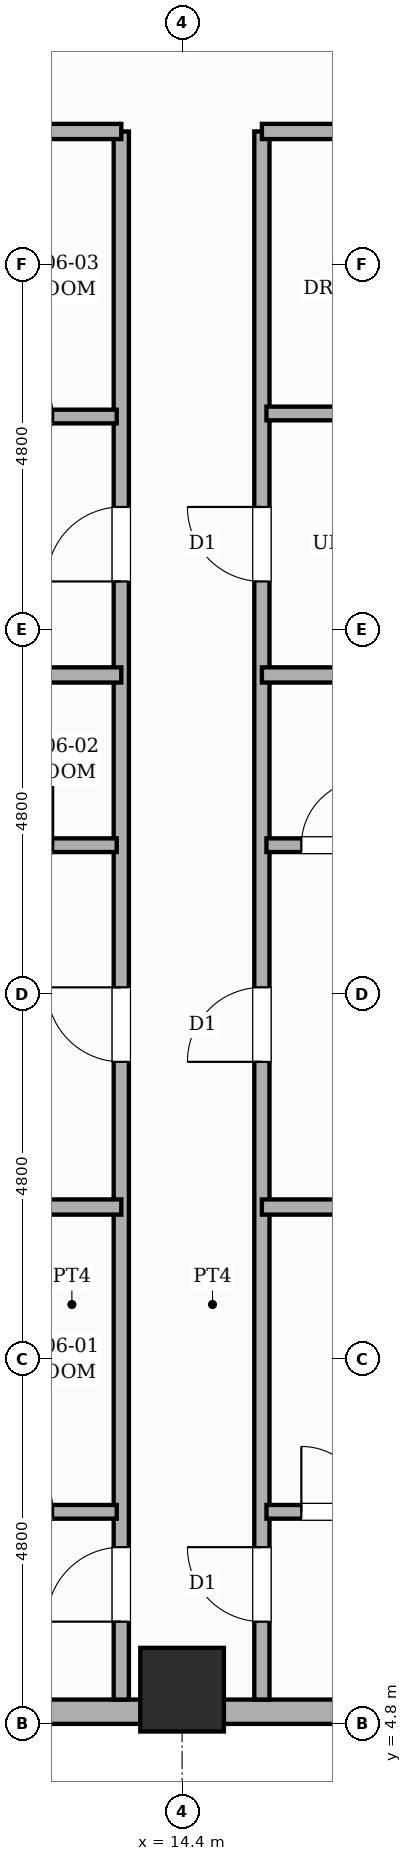
"""IFC4 building model, lengths in metres.
Left out: names, types, materials, properties, quantities, classifications, styles, units other than length and angle.
Written with IfcOpenShell. Run it as: python <this file> out.ifc"""

import sys

from ifc_helpers import new_model, si_unit, direction, frame, frame_2d, origin, origin_2d, place, context, subcontext, project, spatial, rectangle, extrude, element, fill, save


model = new_model("IFC4")
c1 = context("Model", 3, precision=1e-05, world=origin(), true_north=direction((0.0, 1.0)))
c2 = subcontext(c1, "Body", "Model", "MODEL_VIEW")
j1 = project(units=[si_unit("LENGTHUNIT", "METRE"), si_unit("PLANEANGLEUNIT", "RADIAN")], contexts=[c1])
p1 = place(None, origin())
s1 = spatial("IfcSite", under=j1, at=p1, CompositionType="ELEMENT")
p2 = place(p1, origin())
s2 = spatial("IfcBuilding", under=s1, at=p2, CompositionType="ELEMENT")
p3 = place(p2, frame((0.0, 0.0, 28.6)))
s3 = spatial("IfcBuildingStorey", under=s2, at=p3, CompositionType="ELEMENT", Elevation=28.6)
p4 = place(p3, frame((14.4, 5.25, 0.0), z_axis=(0.0, 0.0, 1.0), x_axis=(1.0, 0.0, 0.0)))
e1 = element("IfcColumn", 1, at=p4, inside=s3, PredefinedType="COLUMN", context=c2, shape_type="SweptSolid", body=[
    extrude(rectangle(XDim=1.1, YDim=1.1, at=origin_2d()), origin(), (0.0, 0.0, 1.0), 3.6),
])
p5 = place(p3, frame((21.6, 4.96, 0.0), z_axis=(0.0, 0.0, 1.0), x_axis=(-1.0, 0.0, 0.0)))
e2 = element("IfcWall", 2, at=p5, inside=s3, PredefinedType="STANDARD", context=c2, shape_type="SweptSolid", body=[
    extrude(rectangle(XDim=14.4, YDim=0.32, at=frame_2d((7.2, 0.0))), origin(), (0.0, 0.0, 1.0), 2.53),
])
p6 = place(p5, frame((9.015, 0.0, 0.65)))
e3 = element("IfcOpeningElement", 3, at=p6, cuts=e2, PredefinedType="OPENING", context=c2, shape_type="SweptSolid", body=[
    extrude(rectangle(XDim=1.4, YDim=1.1, at=frame_2d((0.7, 0.55))), frame((0.0, 0.17, 0.0), z_axis=(0.0, -1.0, 0.0), x_axis=(1.0, 0.0, 0.0)), (0.0, 0.0, 1.0), 0.34),
])
p7 = place(p5, frame((0.47, 0.0, 0.45)))
e4 = element("IfcOpeningElement", 4, at=p7, cuts=e2, PredefinedType="OPENING", context=c2, shape_type="SweptSolid", body=[
    extrude(rectangle(XDim=0.95, YDim=1.8, at=frame_2d((0.475, 0.9))), frame((0.0, 0.17, 0.0), z_axis=(0.0, -1.0, 0.0), x_axis=(1.0, 0.0, 0.0)), (0.0, 0.0, 1.0), 0.34),
])
p8 = place(p3, frame((13.6, 5.12, 0.0), z_axis=(0.0, 0.0, 1.0), x_axis=(0.0, 1.0, 0.0)))
e5 = element("IfcWall", 5, at=p8, inside=s3, PredefinedType="PARTITIONING", context=c2, shape_type="SweptSolid", body=[
    extrude(rectangle(XDim=20.63, YDim=0.2, at=frame_2d((10.315, 0.0))), origin(), (0.0, 0.0, 1.0), 3.35),
])
p9 = place(p8, frame((1.025, 0.0, 0.0)))
e6 = element("IfcOpeningElement", 6, at=p9, cuts=e5, PredefinedType="OPENING", context=c2, shape_type="SweptSolid", body=[
    extrude(rectangle(XDim=0.98, YDim=2.18, at=frame_2d((0.49, 1.09))), frame((0.0, 0.11, 0.0), z_axis=(0.0, -1.0, 0.0), x_axis=(1.0, 0.0, 0.0)), (0.0, 0.0, 1.0), 0.22),
])
p10 = place(p8, frame((8.39, 0.0, 0.0)))
e7 = element("IfcOpeningElement", 7, at=p10, cuts=e5, PredefinedType="OPENING", context=c2, shape_type="SweptSolid", body=[
    extrude(rectangle(XDim=0.98, YDim=2.18, at=frame_2d((0.49, 1.09))), frame((0.0, 0.11, 0.0), z_axis=(0.0, -1.0, 0.0), x_axis=(1.0, 0.0, 0.0)), (0.0, 0.0, 1.0), 0.22),
])
p11 = place(p8, frame((14.71, 0.0, 0.0)))
e8 = element("IfcOpeningElement", 8, at=p11, cuts=e5, PredefinedType="OPENING", context=c2, shape_type="SweptSolid", body=[
    extrude(rectangle(XDim=0.98, YDim=2.18, at=frame_2d((0.49, 1.09))), frame((0.0, 0.11, 0.0), z_axis=(0.0, -1.0, 0.0), x_axis=(1.0, 0.0, 0.0)), (0.0, 0.0, 1.0), 0.22),
])
p12 = place(p3, frame((15.45, 5.12, 0.0), z_axis=(0.0, 0.0, 1.0), x_axis=(0.0, 1.0, 0.0)))
e9 = element("IfcWall", 9, at=p12, inside=s3, PredefinedType="PARTITIONING", context=c2, shape_type="SweptSolid", body=[
    extrude(rectangle(XDim=20.63, YDim=0.2, at=frame_2d((10.315, 0.0))), origin(), (0.0, 0.0, 1.0), 3.35),
])
p13 = place(p12, frame((1.025, 0.0, 0.0)))
e10 = element("IfcOpeningElement", 10, at=p13, cuts=e9, PredefinedType="OPENING", context=c2, shape_type="SweptSolid", body=[
    extrude(rectangle(XDim=0.98, YDim=2.18, at=frame_2d((0.49, 1.09))), frame((0.0, 0.11, 0.0), z_axis=(0.0, -1.0, 0.0), x_axis=(1.0, 0.0, 0.0)), (0.0, 0.0, 1.0), 0.22),
])
p14 = place(p12, frame((8.39, 0.0, 0.0)))
e11 = element("IfcOpeningElement", 11, at=p14, cuts=e9, PredefinedType="OPENING", context=c2, shape_type="SweptSolid", body=[
    extrude(rectangle(XDim=0.98, YDim=2.18, at=frame_2d((0.49, 1.09))), frame((0.0, 0.11, 0.0), z_axis=(0.0, -1.0, 0.0), x_axis=(1.0, 0.0, 0.0)), (0.0, 0.0, 1.0), 0.22),
])
p15 = place(p12, frame((14.71, 0.0, 0.0)))
e12 = element("IfcOpeningElement", 12, at=p15, cuts=e9, PredefinedType="OPENING", context=c2, shape_type="SweptSolid", body=[
    extrude(rectangle(XDim=0.98, YDim=2.18, at=frame_2d((0.49, 1.09))), frame((0.0, 0.11, 0.0), z_axis=(0.0, -1.0, 0.0), x_axis=(1.0, 0.0, 0.0)), (0.0, 0.0, 1.0), 0.22),
])
p16 = place(p3, frame((5.12, 25.75, 0.0), z_axis=(0.0, 0.0, 1.0), x_axis=(1.0, 0.0, 0.0)))
e13 = element("IfcWall", 13, at=p16, inside=s3, PredefinedType="PARTITIONING", context=c2, shape_type="SweptSolid", body=[
    extrude(rectangle(XDim=8.48, YDim=0.2, at=frame_2d((4.24, 0.0))), origin(), (0.0, 0.0, 1.0), 3.35),
])
p17 = place(p3, frame((15.45, 25.75, 0.0), z_axis=(0.0, 0.0, 1.0), x_axis=(1.0, 0.0, 0.0)))
e14 = element("IfcWall", 14, at=p17, inside=s3, PredefinedType="PARTITIONING", context=c2, shape_type="SweptSolid", body=[
    extrude(rectangle(XDim=8.23, YDim=0.2, at=frame_2d((4.115, 0.0))), origin(), (0.0, 0.0, 1.0), 3.35),
])
p18 = place(p3, frame((5.12, 7.59, 0.0), z_axis=(0.0, 0.0, 1.0), x_axis=(1.0, 0.0, 0.0)))
e15 = element("IfcWall", 15, at=p18, inside=s3, PredefinedType="PLUMBINGWALL", context=c2, shape_type="SweptSolid", body=[
    extrude(rectangle(XDim=8.42, YDim=0.18, at=frame_2d((4.21, 0.0))), origin(), (0.0, 0.0, 1.0), 3.35),
])
p19 = place(p18, frame((1.046, 0.0, 0.0)))
e16 = element("IfcOpeningElement", 16, at=p19, cuts=e15, PredefinedType="OPENING", context=c2, shape_type="SweptSolid", body=[
    extrude(rectangle(XDim=0.9, YDim=2.15, at=frame_2d((0.45, 1.075))), frame((0.0, 0.1, 0.0), z_axis=(0.0, -1.0, 0.0), x_axis=(1.0, 0.0, 0.0)), (0.0, 0.0, 1.0), 0.2),
])
p20 = place(p18, frame((4.307, 0.0, 0.0)))
e17 = element("IfcOpeningElement", 17, at=p20, cuts=e15, PredefinedType="OPENING", context=c2, shape_type="SweptSolid", body=[
    extrude(rectangle(XDim=0.9, YDim=2.15, at=frame_2d((0.45, 1.075))), frame((0.0, 0.1, 0.0), z_axis=(0.0, -1.0, 0.0), x_axis=(1.0, 0.0, 0.0)), (0.0, 0.0, 1.0), 0.2),
])
p21 = place(p18, frame((6.723, 0.0, 0.0)))
e18 = element("IfcOpeningElement", 18, at=p21, cuts=e15, PredefinedType="OPENING", context=c2, shape_type="SweptSolid", body=[
    extrude(rectangle(XDim=0.86, YDim=2.1, at=frame_2d((0.43, 1.05))), frame((0.0, 0.1, 0.0), z_axis=(0.0, -1.0, 0.0), x_axis=(1.0, 0.0, 0.0)), (0.0, 0.0, 1.0), 0.2),
])
p22 = place(p3, frame((5.12, 11.6, 0.0), z_axis=(0.0, 0.0, 1.0), x_axis=(1.0, 0.0, 0.0)))
e19 = element("IfcWall", 19, at=p22, inside=s3, PredefinedType="SOLIDWALL", context=c2, shape_type="SweptSolid", body=[
    extrude(rectangle(XDim=8.48, YDim=0.2, at=frame_2d((4.24, 0.0))), origin(), (0.0, 0.0, 1.0), 3.35),
])
p23 = place(p3, frame((5.12, 16.36, 0.0), z_axis=(0.0, 0.0, 1.0), x_axis=(1.0, 0.0, 0.0)))
e20 = element("IfcWall", 20, at=p23, inside=s3, PredefinedType="PLUMBINGWALL", context=c2, shape_type="SweptSolid", body=[
    extrude(rectangle(XDim=8.42, YDim=0.18, at=frame_2d((4.21, 0.0))), origin(), (0.0, 0.0, 1.0), 3.35),
])
p24 = place(p23, frame((1.046, 0.0, 0.0)))
e21 = element("IfcOpeningElement", 21, at=p24, cuts=e20, PredefinedType="OPENING", context=c2, shape_type="SweptSolid", body=[
    extrude(rectangle(XDim=0.9, YDim=2.15, at=frame_2d((0.45, 1.075))), frame((0.0, 0.1, 0.0), z_axis=(0.0, -1.0, 0.0), x_axis=(1.0, 0.0, 0.0)), (0.0, 0.0, 1.0), 0.2),
])
p25 = place(p23, frame((4.307, 0.0, 0.0)))
e22 = element("IfcOpeningElement", 22, at=p25, cuts=e20, PredefinedType="OPENING", context=c2, shape_type="SweptSolid", body=[
    extrude(rectangle(XDim=0.9, YDim=2.15, at=frame_2d((0.45, 1.075))), frame((0.0, 0.1, 0.0), z_axis=(0.0, -1.0, 0.0), x_axis=(1.0, 0.0, 0.0)), (0.0, 0.0, 1.0), 0.2),
])
p26 = place(p23, frame((6.723, 0.0, 0.0)))
e23 = element("IfcOpeningElement", 23, at=p26, cuts=e20, PredefinedType="OPENING", context=c2, shape_type="SweptSolid", body=[
    extrude(rectangle(XDim=0.86, YDim=2.1, at=frame_2d((0.43, 1.05))), frame((0.0, 0.1, 0.0), z_axis=(0.0, -1.0, 0.0), x_axis=(1.0, 0.0, 0.0)), (0.0, 0.0, 1.0), 0.2),
])
p27 = place(p3, frame((5.12, 18.6, 0.0), z_axis=(0.0, 0.0, 1.0), x_axis=(1.0, 0.0, 0.0)))
e24 = element("IfcWall", 24, at=p27, inside=s3, PredefinedType="SOLIDWALL", context=c2, shape_type="SweptSolid", body=[
    extrude(rectangle(XDim=8.48, YDim=0.2, at=frame_2d((4.24, 0.0))), origin(), (0.0, 0.0, 1.0), 3.35),
])
p28 = place(p3, frame((5.12, 22.0, 0.0), z_axis=(0.0, 0.0, 1.0), x_axis=(1.0, 0.0, 0.0)))
e25 = element("IfcWall", 25, at=p28, inside=s3, PredefinedType="PLUMBINGWALL", context=c2, shape_type="SweptSolid", body=[
    extrude(rectangle(XDim=8.42, YDim=0.18, at=frame_2d((4.21, 0.0))), origin(), (0.0, 0.0, 1.0), 3.35),
])
p29 = place(p28, frame((1.046, 0.0, 0.0)))
e26 = element("IfcOpeningElement", 26, at=p29, cuts=e25, PredefinedType="OPENING", context=c2, shape_type="SweptSolid", body=[
    extrude(rectangle(XDim=0.9, YDim=2.15, at=frame_2d((0.45, 1.075))), frame((0.0, 0.1, 0.0), z_axis=(0.0, -1.0, 0.0), x_axis=(1.0, 0.0, 0.0)), (0.0, 0.0, 1.0), 0.2),
])
p30 = place(p28, frame((4.307, 0.0, 0.0)))
e27 = element("IfcOpeningElement", 27, at=p30, cuts=e25, PredefinedType="OPENING", context=c2, shape_type="SweptSolid", body=[
    extrude(rectangle(XDim=0.9, YDim=2.15, at=frame_2d((0.45, 1.075))), frame((0.0, 0.1, 0.0), z_axis=(0.0, -1.0, 0.0), x_axis=(1.0, 0.0, 0.0)), (0.0, 0.0, 1.0), 0.2),
])
p31 = place(p28, frame((6.723, 0.0, 0.0)))
e28 = element("IfcOpeningElement", 28, at=p31, cuts=e25, PredefinedType="OPENING", context=c2, shape_type="SweptSolid", body=[
    extrude(rectangle(XDim=0.86, YDim=2.1, at=frame_2d((0.43, 1.05))), frame((0.0, 0.1, 0.0), z_axis=(0.0, -1.0, 0.0), x_axis=(1.0, 0.0, 0.0)), (0.0, 0.0, 1.0), 0.2),
])
p32 = place(p3, frame((15.51, 7.59, 0.0), z_axis=(0.0, 0.0, 1.0), x_axis=(1.0, 0.0, 0.0)))
e29 = element("IfcWall", 29, at=p32, inside=s3, PredefinedType="PLUMBINGWALL", context=c2, shape_type="SweptSolid", body=[
    extrude(rectangle(XDim=8.17, YDim=0.18, at=frame_2d((4.085, 0.0))), origin(), (0.0, 0.0, 1.0), 3.35),
])
p33 = place(p32, frame((0.459, 0.0, 0.0)))
e30 = element("IfcOpeningElement", 30, at=p33, cuts=e29, PredefinedType="OPENING", context=c2, shape_type="SweptSolid", body=[
    extrude(rectangle(XDim=0.86, YDim=2.1, at=frame_2d((0.43, 1.05))), frame((0.0, 0.1, 0.0), z_axis=(0.0, -1.0, 0.0), x_axis=(1.0, 0.0, 0.0)), (0.0, 0.0, 1.0), 0.2),
])
p34 = place(p32, frame((2.722, 0.0, 0.0)))
e31 = element("IfcOpeningElement", 31, at=p34, cuts=e29, PredefinedType="OPENING", context=c2, shape_type="SweptSolid", body=[
    extrude(rectangle(XDim=0.9, YDim=2.15, at=frame_2d((0.45, 1.075))), frame((0.0, 0.1, 0.0), z_axis=(0.0, -1.0, 0.0), x_axis=(1.0, 0.0, 0.0)), (0.0, 0.0, 1.0), 0.2),
])
p35 = place(p32, frame((5.766, 0.0, 0.0)))
e32 = element("IfcOpeningElement", 32, at=p35, cuts=e29, PredefinedType="OPENING", context=c2, shape_type="SweptSolid", body=[
    extrude(rectangle(XDim=0.9, YDim=2.15, at=frame_2d((0.45, 1.075))), frame((0.0, 0.1, 0.0), z_axis=(0.0, -1.0, 0.0), x_axis=(1.0, 0.0, 0.0)), (0.0, 0.0, 1.0), 0.2),
])
p36 = place(p3, frame((15.45, 11.6, 0.0), z_axis=(0.0, 0.0, 1.0), x_axis=(1.0, 0.0, 0.0)))
e33 = element("IfcWall", 33, at=p36, inside=s3, PredefinedType="SOLIDWALL", context=c2, shape_type="SweptSolid", body=[
    extrude(rectangle(XDim=8.23, YDim=0.2, at=frame_2d((4.115, 0.0))), origin(), (0.0, 0.0, 1.0), 3.35),
])
p37 = place(p3, frame((15.51, 16.36, 0.0), z_axis=(0.0, 0.0, 1.0), x_axis=(1.0, 0.0, 0.0)))
e34 = element("IfcWall", 34, at=p37, inside=s3, PredefinedType="PLUMBINGWALL", context=c2, shape_type="SweptSolid", body=[
    extrude(rectangle(XDim=8.17, YDim=0.18, at=frame_2d((4.085, 0.0))), origin(), (0.0, 0.0, 1.0), 3.35),
])
p38 = place(p37, frame((0.459, 0.0, 0.0)))
e35 = element("IfcOpeningElement", 35, at=p38, cuts=e34, PredefinedType="OPENING", context=c2, shape_type="SweptSolid", body=[
    extrude(rectangle(XDim=0.86, YDim=2.1, at=frame_2d((0.43, 1.05))), frame((0.0, 0.1, 0.0), z_axis=(0.0, -1.0, 0.0), x_axis=(1.0, 0.0, 0.0)), (0.0, 0.0, 1.0), 0.2),
])
p39 = place(p37, frame((2.722, 0.0, 0.0)))
e36 = element("IfcOpeningElement", 36, at=p39, cuts=e34, PredefinedType="OPENING", context=c2, shape_type="SweptSolid", body=[
    extrude(rectangle(XDim=0.9, YDim=2.15, at=frame_2d((0.45, 1.075))), frame((0.0, 0.1, 0.0), z_axis=(0.0, -1.0, 0.0), x_axis=(1.0, 0.0, 0.0)), (0.0, 0.0, 1.0), 0.2),
])
p40 = place(p37, frame((5.766, 0.0, 0.0)))
e37 = element("IfcOpeningElement", 37, at=p40, cuts=e34, PredefinedType="OPENING", context=c2, shape_type="SweptSolid", body=[
    extrude(rectangle(XDim=0.9, YDim=2.15, at=frame_2d((0.45, 1.075))), frame((0.0, 0.1, 0.0), z_axis=(0.0, -1.0, 0.0), x_axis=(1.0, 0.0, 0.0)), (0.0, 0.0, 1.0), 0.2),
])
p41 = place(p3, frame((15.45, 18.6, 0.0), z_axis=(0.0, 0.0, 1.0), x_axis=(1.0, 0.0, 0.0)))
e38 = element("IfcWall", 38, at=p41, inside=s3, PredefinedType="SOLIDWALL", context=c2, shape_type="SweptSolid", body=[
    extrude(rectangle(XDim=8.23, YDim=0.2, at=frame_2d((4.115, 0.0))), origin(), (0.0, 0.0, 1.0), 3.35),
])
p42 = place(p3, frame((15.51, 22.04, 0.0), z_axis=(0.0, 0.0, 1.0), x_axis=(1.0, 0.0, 0.0)))
e39 = element("IfcWall", 39, at=p42, inside=s3, PredefinedType="PLUMBINGWALL", context=c2, shape_type="SweptSolid", body=[
    extrude(rectangle(XDim=8.17, YDim=0.18, at=frame_2d((4.085, 0.0))), origin(), (0.0, 0.0, 1.0), 3.35),
])
p43 = place(p42, frame((1.154, 0.0, 0.0)))
e40 = element("IfcOpeningElement", 40, at=p43, cuts=e39, PredefinedType="OPENING", context=c2, shape_type="SweptSolid", body=[
    extrude(rectangle(XDim=0.9, YDim=2.15, at=frame_2d((0.45, 1.075))), frame((0.0, 0.1, 0.0), z_axis=(0.0, -1.0, 0.0), x_axis=(1.0, 0.0, 0.0)), (0.0, 0.0, 1.0), 0.2),
])
p44 = place(p42, frame((4.116, 0.0, 0.0)))
e41 = element("IfcOpeningElement", 41, at=p44, cuts=e39, PredefinedType="OPENING", context=c2, shape_type="SweptSolid", body=[
    extrude(rectangle(XDim=0.9, YDim=2.15, at=frame_2d((0.45, 1.075))), frame((0.0, 0.1, 0.0), z_axis=(0.0, -1.0, 0.0), x_axis=(1.0, 0.0, 0.0)), (0.0, 0.0, 1.0), 0.2),
])
p45 = place(p42, frame((6.553, 0.0, 0.0)))
e42 = element("IfcOpeningElement", 42, at=p45, cuts=e39, PredefinedType="OPENING", context=c2, shape_type="SweptSolid", body=[
    extrude(rectangle(XDim=0.86, YDim=2.1, at=frame_2d((0.43, 1.05))), frame((0.0, 0.1, 0.0), z_axis=(0.0, -1.0, 0.0), x_axis=(1.0, 0.0, 0.0)), (0.0, 0.0, 1.0), 0.2),
])
p46 = place(p9, origin())
e43 = element("IfcDoor", 43, at=p46, inside=s3, OperationType="SINGLE_SWING_LEFT", PredefinedType="DOOR", context=c2, shape_type="SweptSolid", body=[
    extrude(rectangle(XDim=0.98, YDim=2.18, at=frame_2d((0.49, 1.09))), frame((0.0, 0.025, 0.0), z_axis=(0.0, -1.0, 0.0), x_axis=(1.0, 0.0, 0.0)), (0.0, 0.0, 1.0), 0.05),
])
fill(e6, e43)
p47 = place(p21, origin())
e44 = element("IfcDoor", 44, at=p47, inside=s3, OperationType="SINGLE_SWING_LEFT", PredefinedType="DOOR", context=c2, shape_type="SweptSolid", body=[
    extrude(rectangle(XDim=0.86, YDim=2.1, at=frame_2d((0.43, 1.05))), frame((0.0, 0.025, 0.0), z_axis=(0.0, -1.0, 0.0), x_axis=(1.0, 0.0, 0.0)), (0.0, 0.0, 1.0), 0.05),
])
fill(e18, e44)
p48 = place(p10, origin())
e45 = element("IfcDoor", 45, at=p48, inside=s3, OperationType="SINGLE_SWING_RIGHT", PredefinedType="DOOR", context=c2, shape_type="SweptSolid", body=[
    extrude(rectangle(XDim=0.98, YDim=2.18, at=frame_2d((0.49, 1.09))), frame((0.0, 0.025, 0.0), z_axis=(0.0, -1.0, 0.0), x_axis=(1.0, 0.0, 0.0)), (0.0, 0.0, 1.0), 0.05),
])
fill(e7, e45)
p49 = place(p26, origin())
e46 = element("IfcDoor", 46, at=p49, inside=s3, OperationType="SINGLE_SWING_RIGHT", PredefinedType="DOOR", context=c2, shape_type="SweptSolid", body=[
    extrude(rectangle(XDim=0.86, YDim=2.1, at=frame_2d((0.43, 1.05))), frame((0.0, 0.025, 0.0), z_axis=(0.0, -1.0, 0.0), x_axis=(1.0, 0.0, 0.0)), (0.0, 0.0, 1.0), 0.05),
])
fill(e23, e46)
p50 = place(p11, origin())
e47 = element("IfcDoor", 47, at=p50, inside=s3, OperationType="SINGLE_SWING_LEFT", PredefinedType="DOOR", context=c2, shape_type="SweptSolid", body=[
    extrude(rectangle(XDim=0.98, YDim=2.18, at=frame_2d((0.49, 1.09))), frame((0.0, 0.025, 0.0), z_axis=(0.0, -1.0, 0.0), x_axis=(1.0, 0.0, 0.0)), (0.0, 0.0, 1.0), 0.05),
])
fill(e8, e47)
p51 = place(p31, origin())
e48 = element("IfcDoor", 48, at=p51, inside=s3, OperationType="SINGLE_SWING_LEFT", PredefinedType="DOOR", context=c2, shape_type="SweptSolid", body=[
    extrude(rectangle(XDim=0.86, YDim=2.1, at=frame_2d((0.43, 1.05))), frame((0.0, 0.025, 0.0), z_axis=(0.0, -1.0, 0.0), x_axis=(1.0, 0.0, 0.0)), (0.0, 0.0, 1.0), 0.05),
])
fill(e28, e48)
p52 = place(p13, origin())
e49 = element("IfcDoor", 49, at=p52, inside=s3, OperationType="SINGLE_SWING_RIGHT", PredefinedType="DOOR", context=c2, shape_type="SweptSolid", body=[
    extrude(rectangle(XDim=0.98, YDim=2.18, at=frame_2d((0.49, 1.09))), frame((0.0, 0.025, 0.0), z_axis=(0.0, -1.0, 0.0), x_axis=(1.0, 0.0, 0.0)), (0.0, 0.0, 1.0), 0.05),
])
fill(e10, e49)
p53 = place(p33, origin())
e50 = element("IfcDoor", 50, at=p53, inside=s3, OperationType="SINGLE_SWING_LEFT", PredefinedType="DOOR", context=c2, shape_type="SweptSolid", body=[
    extrude(rectangle(XDim=0.86, YDim=2.1, at=frame_2d((0.43, 1.05))), frame((0.0, 0.025, 0.0), z_axis=(0.0, -1.0, 0.0), x_axis=(1.0, 0.0, 0.0)), (0.0, 0.0, 1.0), 0.05),
])
fill(e30, e50)
p54 = place(p14, origin())
e51 = element("IfcDoor", 51, at=p54, inside=s3, OperationType="SINGLE_SWING_LEFT", PredefinedType="DOOR", context=c2, shape_type="SweptSolid", body=[
    extrude(rectangle(XDim=0.98, YDim=2.18, at=frame_2d((0.49, 1.09))), frame((0.0, 0.025, 0.0), z_axis=(0.0, -1.0, 0.0), x_axis=(1.0, 0.0, 0.0)), (0.0, 0.0, 1.0), 0.05),
])
fill(e11, e51)
p55 = place(p38, origin())
e52 = element("IfcDoor", 52, at=p55, inside=s3, OperationType="SINGLE_SWING_RIGHT", PredefinedType="DOOR", context=c2, shape_type="SweptSolid", body=[
    extrude(rectangle(XDim=0.86, YDim=2.1, at=frame_2d((0.43, 1.05))), frame((0.0, 0.025, 0.0), z_axis=(0.0, -1.0, 0.0), x_axis=(1.0, 0.0, 0.0)), (0.0, 0.0, 1.0), 0.05),
])
fill(e35, e52)
p56 = place(p15, origin())
e53 = element("IfcDoor", 53, at=p56, inside=s3, OperationType="SINGLE_SWING_RIGHT", PredefinedType="DOOR", context=c2, shape_type="SweptSolid", body=[
    extrude(rectangle(XDim=0.98, YDim=2.18, at=frame_2d((0.49, 1.09))), frame((0.0, 0.025, 0.0), z_axis=(0.0, -1.0, 0.0), x_axis=(1.0, 0.0, 0.0)), (0.0, 0.0, 1.0), 0.05),
])
fill(e12, e53)
save(model, sys.argv[1])
